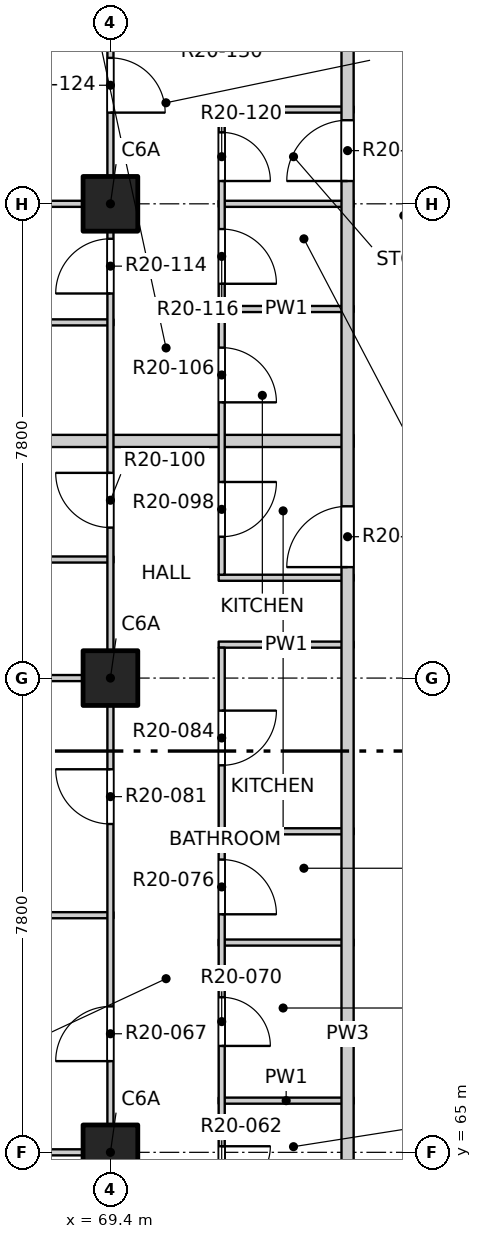
"""IFC4 building model, lengths in metres.
Left out: names, types, materials, properties, quantities, classifications, styles, units other than length and angle.
Written with IfcOpenShell. Run it as: python <this file> out.ifc"""

import sys

from ifc_helpers import new_model, si_unit, direction, frame, frame_2d, origin, origin_2d, place, context, subcontext, project, spatial, rectangle, extrude, element, fill, save


model = new_model("IFC4")
c1 = context("Model", 3, precision=1e-05, world=origin(), true_north=direction((0.0, 1.0)))
c2 = subcontext(c1, "Body", "Model", "MODEL_VIEW")
j1 = project(units=[si_unit("LENGTHUNIT", "METRE"), si_unit("PLANEANGLEUNIT", "RADIAN")], contexts=[c1])
p1 = place(None, origin())
s1 = spatial("IfcSite", under=j1, at=p1, CompositionType="ELEMENT")
p2 = place(p1, origin())
s2 = spatial("IfcBuilding", under=s1, at=p2, CompositionType="ELEMENT")
p3 = place(p2, frame((0.0, 0.0, 210.9)))
s3 = spatial("IfcBuildingStorey", under=s2, at=p3, CompositionType="ELEMENT", Elevation=210.9)
for number, where, z_axis, x_axis in (
    (1, (69.4, 65.0, -0.25), (0.0, 0.0, 1.0), (1.0, 0.0, 0.0)),
    (2, (69.4, 72.8, -0.25), (0.0, 0.0, 1.0), (1.0, 0.0, 0.0)),
    (3, (69.4, 80.6, -0.25), (0.0, 0.0, 1.0), (1.0, 0.0, 0.0)),
):
    element("IfcColumn", number, at=place(p3, frame(where, z_axis=z_axis, x_axis=x_axis)), inside=s3, PredefinedType="COLUMN", context=c2, shape_type="SweptSolid", body=[
        extrude(rectangle(XDim=0.9, YDim=0.9, at=origin_2d()), origin(), (0.0, 0.0, 1.0), 3.4),
    ])
p4 = place(p3, frame((61.9, 65.0, 0.0), z_axis=(0.0, 0.0, 1.0), x_axis=(1.0, 0.0, 0.0)))
e4 = element("IfcWall", 4, at=p4, inside=s3, PredefinedType="PARTITIONING", context=c2, shape_type="SweptSolid", body=[
    extrude(rectangle(XDim=7.55, YDim=0.1, at=frame_2d((3.775, 0.0))), origin(), (0.0, 0.0, 1.0), 3.15),
])
for number, where, z_axis, x_axis in (
    (5, (71.18, 65.85, 0.0), (0.0, 0.0, 1.0), (1.0, 0.0, 0.0)),
    (6, (71.18, 68.45, 0.0), (0.0, 0.0, 1.0), (1.0, 0.0, 0.0)),
):
    element("IfcWall", number, at=place(p3, frame(where, z_axis=z_axis, x_axis=x_axis)), inside=s3, PredefinedType="PARTITIONING", context=c2, shape_type="SweptSolid", body=[
        extrude(rectangle(XDim=2.22, YDim=0.1, at=frame_2d((1.11, 0.0))), origin(), (0.0, 0.0, 1.0), 3.15),
    ])
p5 = place(p3, frame((61.9, 68.9, 0.0), z_axis=(0.0, 0.0, 1.0), x_axis=(1.0, 0.0, 0.0)))
e7 = element("IfcWall", 7, at=p5, inside=s3, PredefinedType="PARTITIONING", context=c2, shape_type="SweptSolid", body=[
    extrude(rectangle(XDim=7.55, YDim=0.1, at=frame_2d((3.775, 0.0))), origin(), (0.0, 0.0, 1.0), 2.55),
])
p6 = place(p3, frame((71.18, 70.28, 0.0), z_axis=(0.0, 0.0, 1.0), x_axis=(1.0, 0.0, 0.0)))
e8 = element("IfcWall", 8, at=p6, inside=s3, PredefinedType="PARTITIONING", context=c2, shape_type="SweptSolid", body=[
    extrude(rectangle(XDim=2.22, YDim=0.1, at=frame_2d((1.11, 0.0))), origin(), (0.0, 0.0, 1.0), 3.15),
])
p7 = place(p3, frame((61.9, 72.8, 0.0), z_axis=(0.0, 0.0, 1.0), x_axis=(1.0, 0.0, 0.0)))
e9 = element("IfcWall", 9, at=p7, inside=s3, PredefinedType="PARTITIONING", context=c2, shape_type="SweptSolid", body=[
    extrude(rectangle(XDim=7.55, YDim=0.1, at=frame_2d((3.775, 0.0))), origin(), (0.0, 0.0, 1.0), 3.15),
])
for number, where, z_axis, x_axis in (
    (10, (71.18, 73.35, 0.0), (0.0, 0.0, 1.0), (1.0, 0.0, 0.0)),
    (11, (71.18, 74.45, 0.0), (0.0, 0.0, 1.0), (1.0, 0.0, 0.0)),
):
    element("IfcWall", number, at=place(p3, frame(where, z_axis=z_axis, x_axis=x_axis)), inside=s3, PredefinedType="PARTITIONING", context=c2, shape_type="SweptSolid", body=[
        extrude(rectangle(XDim=2.22, YDim=0.1, at=frame_2d((1.11, 0.0))), origin(), (0.0, 0.0, 1.0), 3.15),
    ])
p8 = place(p3, frame((65.75, 74.75, 0.0), z_axis=(0.0, 0.0, 1.0), x_axis=(1.0, 0.0, 0.0)))
e12 = element("IfcWall", 12, at=p8, inside=s3, PredefinedType="PARTITIONING", context=c2, shape_type="SweptSolid", body=[
    extrude(rectangle(XDim=3.7, YDim=0.1, at=frame_2d((1.85, 0.0))), origin(), (0.0, 0.0, 1.0), 3.15),
])
p9 = place(p3, frame((61.9, 76.7, 0.0), z_axis=(0.0, 0.0, 1.0), x_axis=(1.0, 0.0, 0.0)))
e13 = element("IfcWall", 13, at=p9, inside=s3, PredefinedType="PARTITIONING", context=c2, shape_type="SweptSolid", body=[
    extrude(rectangle(XDim=11.5, YDim=0.2, at=frame_2d((5.75, 0.0))), origin(), (0.0, 0.0, 1.0), 2.55),
])
p10 = place(p3, frame((65.75, 78.65, 0.0), z_axis=(0.0, 0.0, 1.0), x_axis=(1.0, 0.0, 0.0)))
e14 = element("IfcWall", 14, at=p10, inside=s3, PredefinedType="PARTITIONING", context=c2, shape_type="SweptSolid", body=[
    extrude(rectangle(XDim=3.7, YDim=0.1, at=frame_2d((1.85, 0.0))), origin(), (0.0, 0.0, 1.0), 3.15),
])
p11 = place(p3, frame((71.18, 78.87, 0.0), z_axis=(0.0, 0.0, 1.0), x_axis=(1.0, 0.0, 0.0)))
e15 = element("IfcWall", 15, at=p11, inside=s3, PredefinedType="PARTITIONING", context=c2, shape_type="SweptSolid", body=[
    extrude(rectangle(XDim=2.22, YDim=0.1, at=frame_2d((1.11, 0.0))), origin(), (0.0, 0.0, 1.0), 3.15),
])
p12 = place(p3, frame((61.9, 80.6, 0.0), z_axis=(0.0, 0.0, 1.0), x_axis=(1.0, 0.0, 0.0)))
e16 = element("IfcWall", 16, at=p12, inside=s3, PredefinedType="PARTITIONING", context=c2, shape_type="SweptSolid", body=[
    extrude(rectangle(XDim=7.55, YDim=0.1, at=frame_2d((3.775, 0.0))), origin(), (0.0, 0.0, 1.0), 3.15),
])
for number, where, z_axis, x_axis in (
    (17, (71.18, 80.6, 0.0), (0.0, 0.0, 1.0), (1.0, 0.0, 0.0)),
    (18, (71.18, 82.15, 0.0), (0.0, 0.0, 1.0), (1.0, 0.0, 0.0)),
):
    element("IfcWall", number, at=place(p3, frame(where, z_axis=z_axis, x_axis=x_axis)), inside=s3, PredefinedType="PARTITIONING", context=c2, shape_type="SweptSolid", body=[
        extrude(rectangle(XDim=2.22, YDim=0.1, at=frame_2d((1.11, 0.0))), origin(), (0.0, 0.0, 1.0), 3.15),
    ])
p13 = place(p3, frame((69.4, 41.9, 0.0), z_axis=(0.0, 0.0, 1.0), x_axis=(0.0, 1.0, 0.0)))
e19 = element("IfcWall", 19, at=p13, inside=s3, PredefinedType="PARTITIONING", context=c2, shape_type="SweptSolid", body=[
    extrude(rectangle(XDim=46.2, YDim=0.1, at=frame_2d((23.1, 0.0))), origin(), (0.0, 0.0, 1.0), 3.15),
])
p14 = place(p13, frame((1.2, 0.0, 0.0)))
e20 = element("IfcOpeningElement", 20, at=p14, cuts=e19, PredefinedType="OPENING", context=c2, shape_type="SweptSolid", body=[
    extrude(rectangle(XDim=0.9, YDim=2.1, at=frame_2d((0.45, 1.05))), frame((0.0, 0.06, 0.0), z_axis=(0.0, -1.0, 0.0), x_axis=(1.0, 0.0, 0.0)), (0.0, 0.0, 1.0), 0.12),
])
p15 = place(p13, frame((5.1, 0.0, 0.0)))
e21 = element("IfcOpeningElement", 21, at=p15, cuts=e19, PredefinedType="OPENING", context=c2, shape_type="SweptSolid", body=[
    extrude(rectangle(XDim=0.9, YDim=2.1, at=frame_2d((0.45, 1.05))), frame((0.0, 0.06, 0.0), z_axis=(0.0, -1.0, 0.0), x_axis=(1.0, 0.0, 0.0)), (0.0, 0.0, 1.0), 0.12),
])
p16 = place(p13, frame((9.975, 0.0, 0.0)))
e22 = element("IfcOpeningElement", 22, at=p16, cuts=e19, PredefinedType="OPENING", context=c2, shape_type="SweptSolid", body=[
    extrude(rectangle(XDim=0.9, YDim=2.1, at=frame_2d((0.45, 1.05))), frame((0.0, 0.06, 0.0), z_axis=(0.0, -1.0, 0.0), x_axis=(1.0, 0.0, 0.0)), (0.0, 0.0, 1.0), 0.12),
])
p17 = place(p13, frame((12.9, 0.0, 0.0)))
e23 = element("IfcOpeningElement", 23, at=p17, cuts=e19, PredefinedType="OPENING", context=c2, shape_type="SweptSolid", body=[
    extrude(rectangle(XDim=0.9, YDim=2.1, at=frame_2d((0.45, 1.05))), frame((0.0, 0.06, 0.0), z_axis=(0.0, -1.0, 0.0), x_axis=(1.0, 0.0, 0.0)), (0.0, 0.0, 1.0), 0.12),
])
p18 = place(p13, frame((17.775, 0.0, 0.0)))
e24 = element("IfcOpeningElement", 24, at=p18, cuts=e19, PredefinedType="OPENING", context=c2, shape_type="SweptSolid", body=[
    extrude(rectangle(XDim=0.9, YDim=2.1, at=frame_2d((0.45, 1.05))), frame((0.0, 0.06, 0.0), z_axis=(0.0, -1.0, 0.0), x_axis=(1.0, 0.0, 0.0)), (0.0, 0.0, 1.0), 0.12),
])
p19 = place(p13, frame((21.625, 0.0, 0.0)))
e25 = element("IfcOpeningElement", 25, at=p19, cuts=e19, PredefinedType="OPENING", context=c2, shape_type="SweptSolid", body=[
    extrude(rectangle(XDim=0.9, YDim=2.1, at=frame_2d((0.45, 1.05))), frame((0.0, 0.06, 0.0), z_axis=(0.0, -1.0, 0.0), x_axis=(1.0, 0.0, 0.0)), (0.0, 0.0, 1.0), 0.12),
])
p20 = place(p13, frame((24.6, 0.0, 0.0)))
e26 = element("IfcOpeningElement", 26, at=p20, cuts=e19, PredefinedType="OPENING", context=c2, shape_type="SweptSolid", body=[
    extrude(rectangle(XDim=0.9, YDim=2.1, at=frame_2d((0.45, 1.05))), frame((0.0, 0.06, 0.0), z_axis=(0.0, -1.0, 0.0), x_axis=(1.0, 0.0, 0.0)), (0.0, 0.0, 1.0), 0.12),
])
p21 = place(p13, frame((28.5, 0.0, 0.0)))
e27 = element("IfcOpeningElement", 27, at=p21, cuts=e19, PredefinedType="OPENING", context=c2, shape_type="SweptSolid", body=[
    extrude(rectangle(XDim=0.9, YDim=2.1, at=frame_2d((0.45, 1.05))), frame((0.0, 0.06, 0.0), z_axis=(0.0, -1.0, 0.0), x_axis=(1.0, 0.0, 0.0)), (0.0, 0.0, 1.0), 0.12),
])
p22 = place(p13, frame((33.375, 0.0, 0.0)))
e28 = element("IfcOpeningElement", 28, at=p22, cuts=e19, PredefinedType="OPENING", context=c2, shape_type="SweptSolid", body=[
    extrude(rectangle(XDim=0.9, YDim=2.1, at=frame_2d((0.45, 1.05))), frame((0.0, 0.06, 0.0), z_axis=(0.0, -1.0, 0.0), x_axis=(1.0, 0.0, 0.0)), (0.0, 0.0, 1.0), 0.12),
])
p23 = place(p13, frame((37.225, 0.0, 0.0)))
e29 = element("IfcOpeningElement", 29, at=p23, cuts=e19, PredefinedType="OPENING", context=c2, shape_type="SweptSolid", body=[
    extrude(rectangle(XDim=0.9, YDim=2.1, at=frame_2d((0.45, 1.05))), frame((0.0, 0.06, 0.0), z_axis=(0.0, -1.0, 0.0), x_axis=(1.0, 0.0, 0.0)), (0.0, 0.0, 1.0), 0.12),
])
p24 = place(p13, frame((40.2, 0.0, 0.0)))
e30 = element("IfcOpeningElement", 30, at=p24, cuts=e19, PredefinedType="OPENING", context=c2, shape_type="SweptSolid", body=[
    extrude(rectangle(XDim=0.9, YDim=2.1, at=frame_2d((0.45, 1.05))), frame((0.0, 0.06, 0.0), z_axis=(0.0, -1.0, 0.0), x_axis=(1.0, 0.0, 0.0)), (0.0, 0.0, 1.0), 0.12),
])
p25 = place(p13, frame((44.1, 0.0, 0.0)))
e31 = element("IfcOpeningElement", 31, at=p25, cuts=e19, PredefinedType="OPENING", context=c2, shape_type="SweptSolid", body=[
    extrude(rectangle(XDim=0.9, YDim=2.1, at=frame_2d((0.45, 1.05))), frame((0.0, 0.06, 0.0), z_axis=(0.0, -1.0, 0.0), x_axis=(1.0, 0.0, 0.0)), (0.0, 0.0, 1.0), 0.12),
])
p26 = place(p3, frame((71.23, 55.05, 0.0), z_axis=(0.0, 0.0, 1.0), x_axis=(0.0, 1.0, 0.0)))
e32 = element("IfcWall", 32, at=p26, inside=s3, PredefinedType="PARTITIONING", context=c2, shape_type="SweptSolid", body=[
    extrude(rectangle(XDim=18.25, YDim=0.1, at=frame_2d((9.125, 0.0))), origin(), (0.0, 0.0, 1.0), 3.15),
])
p27 = place(p26, frame((0.4, 0.0, 0.0)))
e33 = element("IfcOpeningElement", 33, at=p27, cuts=e32, PredefinedType="OPENING", context=c2, shape_type="SweptSolid", body=[
    extrude(rectangle(XDim=0.9, YDim=2.1, at=frame_2d((0.45, 1.05))), frame((0.0, 0.06, 0.0), z_axis=(0.0, -1.0, 0.0), x_axis=(1.0, 0.0, 0.0)), (0.0, 0.0, 1.0), 0.12),
])
p28 = place(p26, frame((2.425, 0.0, 0.0)))
e34 = element("IfcOpeningElement", 34, at=p28, cuts=e32, PredefinedType="OPENING", context=c2, shape_type="SweptSolid", body=[
    extrude(rectangle(XDim=0.8, YDim=2.1, at=frame_2d((0.4, 1.05))), frame((0.0, 0.06, 0.0), z_axis=(0.0, -1.0, 0.0), x_axis=(1.0, 0.0, 0.0)), (0.0, 0.0, 1.0), 0.12),
])
p29 = place(p26, frame((4.575, 0.0, 0.0)))
e35 = element("IfcOpeningElement", 35, at=p29, cuts=e32, PredefinedType="OPENING", context=c2, shape_type="SweptSolid", body=[
    extrude(rectangle(XDim=0.8, YDim=2.1, at=frame_2d((0.4, 1.05))), frame((0.0, 0.06, 0.0), z_axis=(0.0, -1.0, 0.0), x_axis=(1.0, 0.0, 0.0)), (0.0, 0.0, 1.0), 0.12),
])
p30 = place(p26, frame((6.875, 0.0, 0.0)))
e36 = element("IfcOpeningElement", 36, at=p30, cuts=e32, PredefinedType="OPENING", context=c2, shape_type="SweptSolid", body=[
    extrude(rectangle(XDim=0.8, YDim=2.1, at=frame_2d((0.4, 1.05))), frame((0.0, 0.06, 0.0), z_axis=(0.0, -1.0, 0.0), x_axis=(1.0, 0.0, 0.0)), (0.0, 0.0, 1.0), 0.12),
])
p31 = place(p26, frame((9.25, 0.0, 0.0)))
e37 = element("IfcOpeningElement", 37, at=p31, cuts=e32, PredefinedType="OPENING", context=c2, shape_type="SweptSolid", body=[
    extrude(rectangle(XDim=0.8, YDim=2.1, at=frame_2d((0.4, 1.05))), frame((0.0, 0.06, 0.0), z_axis=(0.0, -1.0, 0.0), x_axis=(1.0, 0.0, 0.0)), (0.0, 0.0, 1.0), 0.12),
])
p32 = place(p26, frame((11.7, 0.0, 0.0)))
e38 = element("IfcOpeningElement", 38, at=p32, cuts=e32, PredefinedType="OPENING", context=c2, shape_type="SweptSolid", body=[
    extrude(rectangle(XDim=0.8, YDim=2.1, at=frame_2d((0.4, 1.05))), frame((0.0, 0.06, 0.0), z_axis=(0.0, -1.0, 0.0), x_axis=(1.0, 0.0, 0.0)), (0.0, 0.0, 1.0), 0.12),
])
p33 = place(p26, frame((13.865, 0.0, 0.0)))
e39 = element("IfcOpeningElement", 39, at=p33, cuts=e32, PredefinedType="OPENING", context=c2, shape_type="SweptSolid", body=[
    extrude(rectangle(XDim=0.9, YDim=2.1, at=frame_2d((0.45, 1.05))), frame((0.0, 0.06, 0.0), z_axis=(0.0, -1.0, 0.0), x_axis=(1.0, 0.0, 0.0)), (0.0, 0.0, 1.0), 0.12),
])
p34 = place(p26, frame((16.315, 0.0, 0.0)))
e40 = element("IfcOpeningElement", 40, at=p34, cuts=e32, PredefinedType="OPENING", context=c2, shape_type="SweptSolid", body=[
    extrude(rectangle(XDim=0.9, YDim=2.1, at=frame_2d((0.45, 1.05))), frame((0.0, 0.06, 0.0), z_axis=(0.0, -1.0, 0.0), x_axis=(1.0, 0.0, 0.0)), (0.0, 0.0, 1.0), 0.12),
])
p35 = place(p3, frame((71.23, 74.5, 0.0), z_axis=(0.0, 0.0, 1.0), x_axis=(0.0, 1.0, 0.0)))
e41 = element("IfcWall", 41, at=p35, inside=s3, PredefinedType="PARTITIONING", context=c2, shape_type="SweptSolid", body=[
    extrude(rectangle(XDim=7.6, YDim=0.1, at=frame_2d((3.8, 0.0))), origin(), (0.0, 0.0, 1.0), 3.15),
])
p36 = place(p35, frame((0.625, 0.0, 0.0)))
e42 = element("IfcOpeningElement", 42, at=p36, cuts=e41, PredefinedType="OPENING", context=c2, shape_type="SweptSolid", body=[
    extrude(rectangle(XDim=0.9, YDim=2.1, at=frame_2d((0.45, 1.05))), frame((0.0, 0.06, 0.0), z_axis=(0.0, -1.0, 0.0), x_axis=(1.0, 0.0, 0.0)), (0.0, 0.0, 1.0), 0.12),
])
p37 = place(p35, frame((2.835, 0.0, 0.0)))
e43 = element("IfcOpeningElement", 43, at=p37, cuts=e41, PredefinedType="OPENING", context=c2, shape_type="SweptSolid", body=[
    extrude(rectangle(XDim=0.9, YDim=2.1, at=frame_2d((0.45, 1.05))), frame((0.0, 0.06, 0.0), z_axis=(0.0, -1.0, 0.0), x_axis=(1.0, 0.0, 0.0)), (0.0, 0.0, 1.0), 0.12),
])
p38 = place(p35, frame((4.785, 0.0, 0.0)))
e44 = element("IfcOpeningElement", 44, at=p38, cuts=e41, PredefinedType="OPENING", context=c2, shape_type="SweptSolid", body=[
    extrude(rectangle(XDim=0.9, YDim=2.1, at=frame_2d((0.45, 1.05))), frame((0.0, 0.06, 0.0), z_axis=(0.0, -1.0, 0.0), x_axis=(1.0, 0.0, 0.0)), (0.0, 0.0, 1.0), 0.12),
])
p39 = place(p35, frame((6.475, 0.0, 0.0)))
e45 = element("IfcOpeningElement", 45, at=p39, cuts=e41, PredefinedType="OPENING", context=c2, shape_type="SweptSolid", body=[
    extrude(rectangle(XDim=0.8, YDim=2.1, at=frame_2d((0.4, 1.05))), frame((0.0, 0.06, 0.0), z_axis=(0.0, -1.0, 0.0), x_axis=(1.0, 0.0, 0.0)), (0.0, 0.0, 1.0), 0.12),
])
p40 = place(p3, frame((73.3, 49.5, 0.0), z_axis=(0.0, 0.0, 1.0), x_axis=(0.0, 1.0, 0.0)))
e46 = element("IfcWall", 46, at=p40, inside=s3, PredefinedType="PARTITIONING", context=c2, shape_type="SweptSolid", body=[
    extrude(rectangle(XDim=34.9, YDim=0.2, at=frame_2d((17.45, 0.0))), origin(), (0.0, 0.0, 1.0), 3.15),
])
p41 = place(p40, frame((3.225, 0.0, 0.0)))
e47 = element("IfcOpeningElement", 47, at=p41, cuts=e46, PredefinedType="OPENING", context=c2, shape_type="SweptSolid", body=[
    extrude(rectangle(XDim=1.0, YDim=2.1, at=frame_2d((0.5, 1.05))), frame((0.0, 0.11, 0.0), z_axis=(0.0, -1.0, 0.0), x_axis=(1.0, 0.0, 0.0)), (0.0, 0.0, 1.0), 0.22),
])
p42 = place(p40, frame((25.125, 0.0, 0.0)))
e48 = element("IfcOpeningElement", 48, at=p42, cuts=e46, PredefinedType="OPENING", context=c2, shape_type="SweptSolid", body=[
    extrude(rectangle(XDim=1.0, YDim=2.1, at=frame_2d((0.5, 1.05))), frame((0.0, 0.11, 0.0), z_axis=(0.0, -1.0, 0.0), x_axis=(1.0, 0.0, 0.0)), (0.0, 0.0, 1.0), 0.22),
])
p43 = place(p40, frame((31.475, 0.0, 0.0)))
e49 = element("IfcOpeningElement", 49, at=p43, cuts=e46, PredefinedType="OPENING", context=c2, shape_type="SweptSolid", body=[
    extrude(rectangle(XDim=1.0, YDim=2.1, at=frame_2d((0.5, 1.05))), frame((0.0, 0.11, 0.0), z_axis=(0.0, -1.0, 0.0), x_axis=(1.0, 0.0, 0.0)), (0.0, 0.0, 1.0), 0.22),
])
p44 = place(p31, origin())
e50 = element("IfcDoor", 50, at=p44, inside=s3, OperationType="SINGLE_SWING_LEFT", PredefinedType="DOOR", context=c2, shape_type="SweptSolid", body=[
    extrude(rectangle(XDim=0.8, YDim=2.1, at=frame_2d((0.4, 1.05))), frame((0.0, 0.025, 0.0), z_axis=(0.0, -1.0, 0.0), x_axis=(1.0, 0.0, 0.0)), (0.0, 0.0, 1.0), 0.05),
])
fill(e37, e50)
p45 = place(p20, origin())
e51 = element("IfcDoor", 51, at=p45, inside=s3, OperationType="SINGLE_SWING_LEFT", PredefinedType="DOOR", context=c2, shape_type="SweptSolid", body=[
    extrude(rectangle(XDim=0.9, YDim=2.1, at=frame_2d((0.45, 1.05))), frame((0.0, 0.025, 0.0), z_axis=(0.0, -1.0, 0.0), x_axis=(1.0, 0.0, 0.0)), (0.0, 0.0, 1.0), 0.05),
])
fill(e26, e51)
p46 = place(p32, origin())
e52 = element("IfcDoor", 52, at=p46, inside=s3, OperationType="SINGLE_SWING_RIGHT", PredefinedType="DOOR", context=c2, shape_type="SweptSolid", body=[
    extrude(rectangle(XDim=0.8, YDim=2.1, at=frame_2d((0.4, 1.05))), frame((0.0, 0.025, 0.0), z_axis=(0.0, -1.0, 0.0), x_axis=(1.0, 0.0, 0.0)), (0.0, 0.0, 1.0), 0.05),
])
fill(e38, e52)
p47 = place(p33, origin())
e53 = element("IfcDoor", 53, at=p47, inside=s3, OperationType="SINGLE_SWING_RIGHT", PredefinedType="DOOR", context=c2, shape_type="SweptSolid", body=[
    extrude(rectangle(XDim=0.9, YDim=2.1, at=frame_2d((0.45, 1.05))), frame((0.0, 0.025, 0.0), z_axis=(0.0, -1.0, 0.0), x_axis=(1.0, 0.0, 0.0)), (0.0, 0.0, 1.0), 0.05),
])
fill(e39, e53)
p48 = place(p21, origin())
e54 = element("IfcDoor", 54, at=p48, inside=s3, OperationType="SINGLE_SWING_RIGHT", PredefinedType="DOOR", context=c2, shape_type="SweptSolid", body=[
    extrude(rectangle(XDim=0.9, YDim=2.1, at=frame_2d((0.45, 1.05))), frame((0.0, 0.025, 0.0), z_axis=(0.0, -1.0, 0.0), x_axis=(1.0, 0.0, 0.0)), (0.0, 0.0, 1.0), 0.05),
])
fill(e27, e54)
p49 = place(p34, origin())
e55 = element("IfcDoor", 55, at=p49, inside=s3, OperationType="SINGLE_SWING_LEFT", PredefinedType="DOOR", context=c2, shape_type="SweptSolid", body=[
    extrude(rectangle(XDim=0.9, YDim=2.1, at=frame_2d((0.45, 1.05))), frame((0.0, 0.025, 0.0), z_axis=(0.0, -1.0, 0.0), x_axis=(1.0, 0.0, 0.0)), (0.0, 0.0, 1.0), 0.05),
])
fill(e40, e55)
p50 = place(p42, origin())
e56 = element("IfcDoor", 56, at=p50, inside=s3, OperationType="SINGLE_SWING_RIGHT", PredefinedType="DOOR", context=c2, shape_type="SweptSolid", body=[
    extrude(rectangle(XDim=1.0, YDim=2.1, at=frame_2d((0.5, 1.05))), frame((0.0, 0.025, 0.0), z_axis=(0.0, -1.0, 0.0), x_axis=(1.0, 0.0, 0.0)), (0.0, 0.0, 1.0), 0.05),
])
fill(e48, e56)
p51 = place(p36, origin())
e57 = element("IfcDoor", 57, at=p51, inside=s3, OperationType="SINGLE_SWING_LEFT", PredefinedType="DOOR", context=c2, shape_type="SweptSolid", body=[
    extrude(rectangle(XDim=0.9, YDim=2.1, at=frame_2d((0.45, 1.05))), frame((0.0, 0.025, 0.0), z_axis=(0.0, -1.0, 0.0), x_axis=(1.0, 0.0, 0.0)), (0.0, 0.0, 1.0), 0.05),
])
fill(e42, e57)
p52 = place(p22, origin())
e58 = element("IfcDoor", 58, at=p52, inside=s3, OperationType="SINGLE_SWING_RIGHT", PredefinedType="DOOR", context=c2, shape_type="SweptSolid", body=[
    extrude(rectangle(XDim=0.9, YDim=2.1, at=frame_2d((0.45, 1.05))), frame((0.0, 0.025, 0.0), z_axis=(0.0, -1.0, 0.0), x_axis=(1.0, 0.0, 0.0)), (0.0, 0.0, 1.0), 0.05),
])
fill(e28, e58)
p53 = place(p37, origin())
e59 = element("IfcDoor", 59, at=p53, inside=s3, OperationType="SINGLE_SWING_RIGHT", PredefinedType="DOOR", context=c2, shape_type="SweptSolid", body=[
    extrude(rectangle(XDim=0.9, YDim=2.1, at=frame_2d((0.45, 1.05))), frame((0.0, 0.025, 0.0), z_axis=(0.0, -1.0, 0.0), x_axis=(1.0, 0.0, 0.0)), (0.0, 0.0, 1.0), 0.05),
])
fill(e43, e59)
p54 = place(p23, origin())
e60 = element("IfcDoor", 60, at=p54, inside=s3, OperationType="SINGLE_SWING_LEFT", PredefinedType="DOOR", context=c2, shape_type="SweptSolid", body=[
    extrude(rectangle(XDim=0.9, YDim=2.1, at=frame_2d((0.45, 1.05))), frame((0.0, 0.025, 0.0), z_axis=(0.0, -1.0, 0.0), x_axis=(1.0, 0.0, 0.0)), (0.0, 0.0, 1.0), 0.05),
])
fill(e29, e60)
p55 = place(p38, origin())
e61 = element("IfcDoor", 61, at=p55, inside=s3, OperationType="SINGLE_SWING_RIGHT", PredefinedType="DOOR", context=c2, shape_type="SweptSolid", body=[
    extrude(rectangle(XDim=0.9, YDim=2.1, at=frame_2d((0.45, 1.05))), frame((0.0, 0.025, 0.0), z_axis=(0.0, -1.0, 0.0), x_axis=(1.0, 0.0, 0.0)), (0.0, 0.0, 1.0), 0.05),
])
fill(e44, e61)
p56 = place(p39, origin())
e62 = element("IfcDoor", 62, at=p56, inside=s3, OperationType="SINGLE_SWING_RIGHT", PredefinedType="DOOR", context=c2, shape_type="SweptSolid", body=[
    extrude(rectangle(XDim=0.8, YDim=2.1, at=frame_2d((0.4, 1.05))), frame((0.0, 0.025, 0.0), z_axis=(0.0, -1.0, 0.0), x_axis=(1.0, 0.0, 0.0)), (0.0, 0.0, 1.0), 0.05),
])
fill(e45, e62)
p57 = place(p43, origin())
e63 = element("IfcDoor", 63, at=p57, inside=s3, OperationType="SINGLE_SWING_LEFT", PredefinedType="DOOR", context=c2, shape_type="SweptSolid", body=[
    extrude(rectangle(XDim=1.0, YDim=2.1, at=frame_2d((0.5, 1.05))), frame((0.0, 0.025, 0.0), z_axis=(0.0, -1.0, 0.0), x_axis=(1.0, 0.0, 0.0)), (0.0, 0.0, 1.0), 0.05),
])
fill(e49, e63)
p58 = place(p24, origin())
e64 = element("IfcDoor", 64, at=p58, inside=s3, OperationType="SINGLE_SWING_RIGHT", PredefinedType="DOOR", context=c2, shape_type="SweptSolid", body=[
    extrude(rectangle(XDim=0.9, YDim=2.1, at=frame_2d((0.45, 1.05))), frame((0.0, 0.025, 0.0), z_axis=(0.0, -1.0, 0.0), x_axis=(1.0, 0.0, 0.0)), (0.0, 0.0, 1.0), 0.05),
])
fill(e30, e64)
save(model, sys.argv[1])
